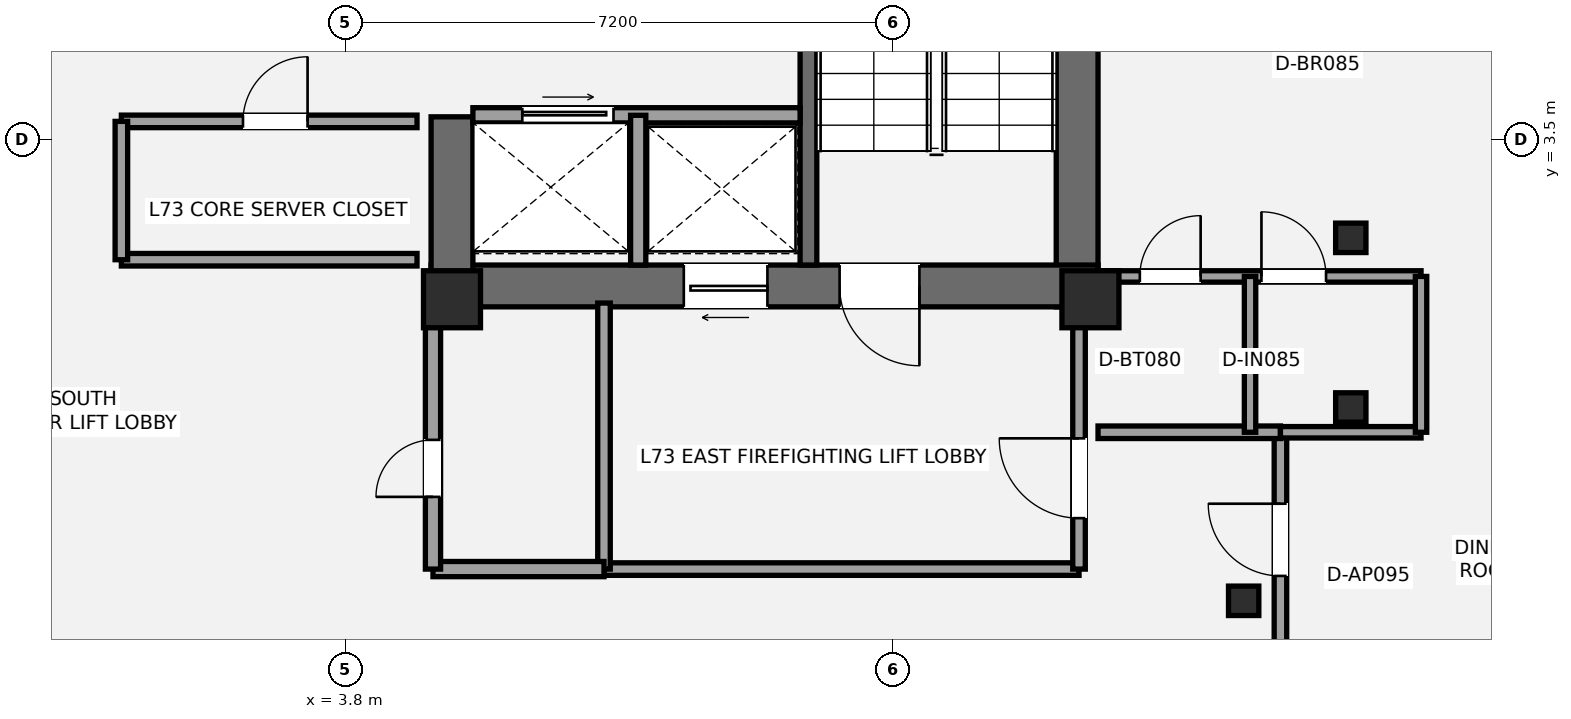
"""IFC4 building model, lengths in metres.
Left out: names, types, materials, properties, quantities, classifications, styles, units other than length and angle.
Written with IfcOpenShell. Run it as: python <this file> out.ifc"""

import sys

from ifc_helpers import new_model, si_unit, direction, frame, frame_2d, origin, origin_2d, place, context, subcontext, project, spatial, rectangle, i_section, extrude, element, fill, save


model = new_model("IFC4")
c1 = context("Model", 3, precision=1e-05, world=origin(), true_north=direction((0.0, 1.0)))
c2 = subcontext(c1, "Body", "Model", "MODEL_VIEW")
j1 = project(units=[si_unit("LENGTHUNIT", "METRE"), si_unit("PLANEANGLEUNIT", "RADIAN")], contexts=[c1])
p1 = place(None, origin())
s1 = spatial("IfcSite", under=j1, at=p1, CompositionType="ELEMENT")
p2 = place(p1, origin())
s2 = spatial("IfcBuilding", under=s1, at=p2, CompositionType="ELEMENT")
p3 = place(p2, frame((0.0, 0.0, 257.25)))
s3 = spatial("IfcBuildingStorey", under=s2, at=p3, CompositionType="ELEMENT", Elevation=257.25)
p4 = place(p3, frame((13.425, 1.3, 0.0), z_axis=(0.0, 0.0, 1.0), x_axis=(0.0, 1.0, 0.0)))
e1 = element("IfcWall", 1, at=p4, inside=s3, PredefinedType="SHEAR", context=c2, shape_type="SweptSolid", body=[
    extrude(rectangle(XDim=8.25, YDim=0.55, at=frame_2d((4.125, 0.0))), origin(), (0.0, 0.0, 1.0), 3.15),
])
p5 = place(p3, frame((13.7, 1.575, 0.0), z_axis=(0.0, 0.0, 1.0), x_axis=(-1.0, 0.0, 0.0)))
e2 = element("IfcWall", 2, at=p5, inside=s3, PredefinedType="SHEAR", context=c2, shape_type="SweptSolid", body=[
    extrude(rectangle(XDim=8.775, YDim=0.55, at=frame_2d((4.387, 0.0))), origin(), (0.0, 0.0, 1.0), 3.15),
])
p6 = place(p5, frame((2.35, 0.0, 0.0)))
e3 = element("IfcOpeningElement", 3, at=p6, cuts=e2, PredefinedType="OPENING", context=c2, shape_type="SweptSolid", body=[
    extrude(rectangle(XDim=1.05, YDim=2.15, at=frame_2d((0.525, 1.075))), frame((0.0, 0.285, 0.0), z_axis=(0.0, -1.0, 0.0), x_axis=(1.0, 0.0, 0.0)), (0.0, 0.0, 1.0), 0.57),
])
p7 = place(p5, frame((4.35, 0.0, 0.0)))
e4 = element("IfcOpeningElement", 4, at=p7, cuts=e2, PredefinedType="OPENING", context=c2, shape_type="SweptSolid", body=[
    extrude(rectangle(XDim=1.1, YDim=2.2, at=frame_2d((0.55, 1.1))), frame((0.0, 0.285, 0.0), z_axis=(0.0, -1.0, 0.0), x_axis=(1.0, 0.0, 0.0)), (0.0, 0.0, 1.0), 0.57),
])
p8 = place(p3, frame((5.2, 1.3, 0.0), z_axis=(0.0, 0.0, 1.0), x_axis=(0.0, 1.0, 0.0)))
e5 = element("IfcWall", 5, at=p8, inside=s3, PredefinedType="SHEAR", context=c2, shape_type="SweptSolid", body=[
    extrude(rectangle(XDim=2.5, YDim=0.55, at=frame_2d((1.25, 0.0))), origin(), (0.0, 0.0, 1.0), 3.15),
])
p9 = place(p3, frame((9.89, 1.85, 0.0), z_axis=(0.0, 0.0, 1.0), x_axis=(0.0, 1.0, 0.0)))
e6 = element("IfcWall", 6, at=p9, inside=s3, PredefinedType="SHEAR", context=c2, shape_type="SweptSolid", body=[
    extrude(rectangle(XDim=7.15, YDim=0.22, at=frame_2d((3.575, 0.0))), origin(), (0.0, 0.0, 1.0), 3.15),
])
for number, where, z_axis, x_axis in (
    (7, (5.2, 1.4, 0.0), (0.0, 0.0, 1.0), (1.0, 0.0, 0.0)),
    (8, (13.6, 1.4, 0.0), (0.0, 0.0, 1.0), (1.0, 0.0, 0.0)),
):
    element("IfcColumn", number, at=place(p3, frame(where, z_axis=z_axis, x_axis=x_axis)), inside=s3, PredefinedType="PILASTER", context=c2, shape_type="SweptSolid", body=[
        extrude(rectangle(XDim=0.75, YDim=0.75, at=origin_2d()), origin(), (0.0, 0.0, 1.0), 3.15),
    ])
for number, where, z_axis, x_axis in (
    (9, (17.026, 2.208, 0.0), (0.0, 0.0, 1.0), (1.0, 0.0, 0.0)),
    (10, (15.616, -2.567, 0.0), (0.0, 0.0, 1.0), (1.0, 0.0, 0.0)),
    (11, (17.026, -0.024, 0.0), (0.0, 0.0, 1.0), (1.0, 0.0, 0.0)),
):
    element("IfcColumn", number, at=place(p3, frame(where, z_axis=z_axis, x_axis=x_axis)), inside=s3, PredefinedType="COLUMN", context=c2, shape_type="SweptSolid", body=[
        extrude(i_section(OverallWidth=0.399, OverallDepth=0.387, WebThickness=0.021, FlangeThickness=0.033, at=origin_2d()), origin(), (0.0, 0.0, 1.0), 3.15),
    ])
p10 = place(p3, frame((7.2, -2.15, 0.0), z_axis=(0.0, 0.0, 1.0), x_axis=(1.0, 0.0, 0.0)))
e12 = element("IfcWall", 12, at=p10, inside=s3, PredefinedType="PARTITIONING", context=c2, shape_type="SweptSolid", body=[
    extrude(rectangle(XDim=6.25, YDim=0.165, at=frame_2d((3.125, 0.0))), origin(), (0.0, 0.0, 1.0), 2.93),
])
p11 = place(p3, frame((7.2, -2.15, 0.0), z_axis=(0.0, 0.0, 1.0), x_axis=(0.0, 1.0, 0.0)))
e13 = element("IfcWall", 13, at=p11, inside=s3, PredefinedType="PARTITIONING", context=c2, shape_type="SweptSolid", body=[
    extrude(rectangle(XDim=3.5, YDim=0.165, at=frame_2d((1.75, 0.0))), origin(), (0.0, 0.0, 1.0), 2.383),
])
p12 = place(p3, frame((13.45, -2.15, 0.0), z_axis=(0.0, 0.0, 1.0), x_axis=(0.0, 1.0, 0.0)))
e14 = element("IfcWall", 14, at=p12, inside=s3, PredefinedType="PARTITIONING", context=c2, shape_type="SweptSolid", body=[
    extrude(rectangle(XDim=3.5, YDim=0.165, at=frame_2d((1.75, 0.0))), origin(), (0.0, 0.0, 1.0), 2.383),
])
p13 = place(p12, frame((0.67, 0.0, 0.0)))
e15 = element("IfcOpeningElement", 15, at=p13, cuts=e14, PredefinedType="OPENING", context=c2, shape_type="SweptSolid", body=[
    extrude(rectangle(XDim=1.05, YDim=2.15, at=frame_2d((0.525, 1.075))), frame((0.0, 0.093, 0.0), z_axis=(0.0, -1.0, 0.0), x_axis=(1.0, 0.0, 0.0)), (0.0, 0.0, 1.0), 0.185),
])
p14 = place(p3, frame((4.95, -2.15, 0.0), z_axis=(0.0, 0.0, 1.0), x_axis=(1.0, 0.0, 0.0)))
e16 = element("IfcWall", 16, at=p14, inside=s3, PredefinedType="SOLIDWALL", context=c2, shape_type="SweptSolid", body=[
    extrude(rectangle(XDim=2.25, YDim=0.2, at=frame_2d((1.125, 0.0))), origin(), (0.0, 0.0, 1.0), 2.93),
])
p15 = place(p3, frame((4.95, -2.15, 0.0), z_axis=(0.0, 0.0, 1.0), x_axis=(0.0, 1.0, 0.0)))
e17 = element("IfcWall", 17, at=p15, inside=s3, PredefinedType="SOLIDWALL", context=c2, shape_type="SweptSolid", body=[
    extrude(rectangle(XDim=3.5, YDim=0.2, at=frame_2d((1.75, 0.0))), origin(), (0.0, 0.0, 1.0), 2.383),
])
p16 = place(p15, frame((0.95, 0.0, 0.0)))
e18 = element("IfcOpeningElement", 18, at=p16, cuts=e17, PredefinedType="OPENING", context=c2, shape_type="SweptSolid", body=[
    extrude(rectangle(XDim=0.75, YDim=2.1, at=frame_2d((0.375, 1.05))), frame((0.0, 0.11, 0.0), z_axis=(0.0, -1.0, 0.0), x_axis=(1.0, 0.0, 0.0)), (0.0, 0.0, 1.0), 0.22),
])
p17 = place(p3, frame((5.475, 3.82, 0.0), z_axis=(0.0, 0.0, 1.0), x_axis=(1.0, 0.0, 0.0)))
e19 = element("IfcWall", 19, at=p17, inside=s3, PredefinedType="SOLIDWALL", context=c2, shape_type="SweptSolid", body=[
    extrude(rectangle(XDim=4.305, YDim=0.2, at=frame_2d((2.152, 0.0))), origin(), (0.0, 0.0, 1.0), 2.93),
])
p18 = place(p17, frame((0.65, 0.0, 0.0)))
e20 = element("IfcOpeningElement", 20, at=p18, cuts=e19, PredefinedType="OPENING", context=c2, shape_type="SweptSolid", body=[
    extrude(rectangle(XDim=1.2, YDim=2.2, at=frame_2d((0.6, 1.1))), frame((0.0, 0.11, 0.0), z_axis=(0.0, -1.0, 0.0), x_axis=(1.0, 0.0, 0.0)), (0.0, 0.0, 1.0), 0.22),
])
p19 = place(p3, frame((7.65, 1.85, 0.0), z_axis=(0.0, 0.0, 1.0), x_axis=(0.0, 1.0, 0.0)))
e21 = element("IfcWall", 21, at=p19, inside=s3, PredefinedType="SOLIDWALL", context=c2, shape_type="SweptSolid", body=[
    extrude(rectangle(XDim=1.97, YDim=0.2, at=frame_2d((0.985, 0.0))), origin(), (0.0, 0.0, 1.0), 2.93),
])
p20 = place(p3, frame((0.85, 1.92, 0.0), z_axis=(0.0, 0.0, 1.0), x_axis=(1.0, 0.0, 0.0)))
e22 = element("IfcWall", 22, at=p20, inside=s3, PredefinedType="PARTITIONING", context=c2, shape_type="SweptSolid", body=[
    extrude(rectangle(XDim=3.89, YDim=0.165, at=frame_2d((1.945, 0.0))), origin(), (0.0, 0.0, 1.0), 2.07),
])
p21 = place(p3, frame((0.85, 3.74, 0.0), z_axis=(0.0, 0.0, 1.0), x_axis=(1.0, 0.0, 0.0)))
e23 = element("IfcWall", 23, at=p21, inside=s3, PredefinedType="PARTITIONING", context=c2, shape_type="SweptSolid", body=[
    extrude(rectangle(XDim=3.89, YDim=0.165, at=frame_2d((1.945, 0.0))), origin(), (0.0, 0.0, 1.0), 2.93),
])
p22 = place(p21, frame((1.6, 0.0, 0.0)))
e24 = element("IfcOpeningElement", 24, at=p22, cuts=e23, PredefinedType="OPENING", context=c2, shape_type="SweptSolid", body=[
    extrude(rectangle(XDim=0.85, YDim=2.1, at=frame_2d((0.425, 1.05))), frame((0.0, 0.093, 0.0), z_axis=(0.0, -1.0, 0.0), x_axis=(1.0, 0.0, 0.0)), (0.0, 0.0, 1.0), 0.185),
])
p23 = place(p3, frame((0.85, 1.92, 0.0), z_axis=(0.0, 0.0, 1.0), x_axis=(0.0, 1.0, 0.0)))
e25 = element("IfcWall", 25, at=p23, inside=s3, PredefinedType="PARTITIONING", context=c2, shape_type="SweptSolid", body=[
    extrude(rectangle(XDim=1.82, YDim=0.165, at=frame_2d((0.91, 0.0))), origin(), (0.0, 0.0, 1.0), 2.93),
])
p24 = place(p3, frame((16.1, -3.95, 0.0), z_axis=(0.0, 0.0, 1.0), x_axis=(0.0, 1.0, 0.0)))
e26 = element("IfcWall", 26, at=p24, inside=s3, PredefinedType="PARTITIONING", context=c2, shape_type="SweptSolid", body=[
    extrude(rectangle(XDim=3.6, YDim=0.165, at=frame_2d((1.8, 0.0))), origin(), (0.0, 0.0, 1.0), 2.317),
])
p25 = place(p24, frame((1.71, 0.0, 0.0)))
e27 = element("IfcOpeningElement", 27, at=p25, cuts=e26, PredefinedType="OPENING", context=c2, shape_type="SweptSolid", body=[
    extrude(rectangle(XDim=0.95, YDim=2.15, at=frame_2d((0.475, 1.075))), frame((0.0, 0.093, 0.0), z_axis=(0.0, -1.0, 0.0), x_axis=(1.0, 0.0, 0.0)), (0.0, 0.0, 1.0), 0.185),
])
p26 = place(p3, frame((13.7, -0.35, 0.0), z_axis=(0.0, 0.0, 1.0), x_axis=(1.0, 0.0, 0.0)))
e28 = element("IfcWall", 28, at=p26, inside=s3, PredefinedType="PARTITIONING", context=c2, shape_type="SweptSolid", body=[
    extrude(rectangle(XDim=2.4, YDim=0.165, at=frame_2d((1.2, 0.0))), origin(), (0.0, 0.0, 1.0), 2.383),
])
p27 = place(p3, frame((13.7, 1.7, 0.0), z_axis=(0.0, 0.0, 1.0), x_axis=(1.0, 0.0, 0.0)))
e29 = element("IfcWall", 29, at=p27, inside=s3, PredefinedType="PLUMBINGWALL", context=c2, shape_type="SweptSolid", body=[
    extrude(rectangle(XDim=4.25, YDim=0.15, at=frame_2d((2.125, 0.0))), origin(), (0.0, 0.0, 1.0), 2.383),
])
p28 = place(p27, frame((0.55, 0.0, 0.0)))
e30 = element("IfcOpeningElement", 30, at=p28, cuts=e29, PredefinedType="OPENING", context=c2, shape_type="SweptSolid", body=[
    extrude(rectangle(XDim=0.8, YDim=2.1, at=frame_2d((0.4, 1.05))), frame((0.0, 0.085, 0.0), z_axis=(0.0, -1.0, 0.0), x_axis=(1.0, 0.0, 0.0)), (0.0, 0.0, 1.0), 0.17),
])
p29 = place(p27, frame((2.15, 0.0, 0.0)))
e31 = element("IfcOpeningElement", 31, at=p29, cuts=e29, PredefinedType="OPENING", context=c2, shape_type="SweptSolid", body=[
    extrude(rectangle(XDim=0.85, YDim=2.1, at=frame_2d((0.425, 1.05))), frame((0.0, 0.085, 0.0), z_axis=(0.0, -1.0, 0.0), x_axis=(1.0, 0.0, 0.0)), (0.0, 0.0, 1.0), 0.17),
])
p30 = place(p3, frame((16.1, -0.35, 0.0), z_axis=(0.0, 0.0, 1.0), x_axis=(1.0, 0.0, 0.0)))
e32 = element("IfcWall", 32, at=p30, inside=s3, PredefinedType="PLUMBINGWALL", context=c2, shape_type="SweptSolid", body=[
    extrude(rectangle(XDim=1.85, YDim=0.15, at=frame_2d((0.925, 0.0))), origin(), (0.0, 0.0, 1.0), 2.383),
])
p31 = place(p3, frame((15.7, -0.35, 0.0), z_axis=(0.0, 0.0, 1.0), x_axis=(0.0, 1.0, 0.0)))
e33 = element("IfcWall", 33, at=p31, inside=s3, PredefinedType="PLUMBINGWALL", context=c2, shape_type="SweptSolid", body=[
    extrude(rectangle(XDim=2.05, YDim=0.15, at=frame_2d((1.025, 0.0))), origin(), (0.0, 0.0, 1.0), 2.93),
])
p32 = place(p3, frame((17.95, -0.35, 0.0), z_axis=(0.0, 0.0, 1.0), x_axis=(0.0, 1.0, 0.0)))
e34 = element("IfcWall", 34, at=p32, inside=s3, PredefinedType="PLUMBINGWALL", context=c2, shape_type="SweptSolid", body=[
    extrude(rectangle(XDim=2.05, YDim=0.15, at=frame_2d((1.025, 0.0))), origin(), (0.0, 0.0, 1.0), 2.383),
])
p33 = place(p6, origin())
e35 = element("IfcDoor", 35, at=p33, inside=s3, OperationType="SINGLE_SWING_LEFT", PredefinedType="DOOR", context=c2, shape_type="SweptSolid", body=[
    extrude(rectangle(XDim=1.05, YDim=2.15, at=frame_2d((0.525, 1.075))), frame((0.0, 0.025, 0.0), z_axis=(0.0, -1.0, 0.0), x_axis=(1.0, 0.0, 0.0)), (0.0, 0.0, 1.0), 0.05),
])
fill(e3, e35)
p34 = place(p13, origin())
e36 = element("IfcDoor", 36, at=p34, inside=s3, OperationType="SINGLE_SWING_RIGHT", PredefinedType="DOOR", context=c2, shape_type="SweptSolid", body=[
    extrude(rectangle(XDim=1.05, YDim=2.15, at=frame_2d((0.525, 1.075))), frame((0.0, 0.025, 0.0), z_axis=(0.0, -1.0, 0.0), x_axis=(1.0, 0.0, 0.0)), (0.0, 0.0, 1.0), 0.05),
])
fill(e15, e36)
p35 = place(p16, origin())
e37 = element("IfcDoor", 37, at=p35, inside=s3, OperationType="SINGLE_SWING_LEFT", PredefinedType="DOOR", context=c2, shape_type="SweptSolid", body=[
    extrude(rectangle(XDim=0.75, YDim=2.1, at=frame_2d((0.375, 1.05))), frame((0.0, 0.025, 0.0), z_axis=(0.0, -1.0, 0.0), x_axis=(1.0, 0.0, 0.0)), (0.0, 0.0, 1.0), 0.05),
])
fill(e18, e37)
p36 = place(p7, origin())
e38 = element("IfcDoor", 38, at=p36, inside=s3, OperationType="SLIDING_TO_LEFT", PredefinedType="DOOR", context=c2, shape_type="SweptSolid", body=[
    extrude(rectangle(XDim=1.1, YDim=2.2, at=frame_2d((0.55, 1.1))), frame((0.0, 0.025, 0.0), z_axis=(0.0, -1.0, 0.0), x_axis=(1.0, 0.0, 0.0)), (0.0, 0.0, 1.0), 0.05),
])
fill(e4, e38)
p37 = place(p18, origin())
e39 = element("IfcDoor", 39, at=p37, inside=s3, OperationType="SLIDING_TO_RIGHT", PredefinedType="DOOR", context=c2, shape_type="SweptSolid", body=[
    extrude(rectangle(XDim=1.2, YDim=2.2, at=frame_2d((0.6, 1.1))), frame((0.0, 0.025, 0.0), z_axis=(0.0, -1.0, 0.0), x_axis=(1.0, 0.0, 0.0)), (0.0, 0.0, 1.0), 0.05),
])
fill(e20, e39)
p38 = place(p22, origin())
e40 = element("IfcDoor", 40, at=p38, inside=s3, OperationType="SINGLE_SWING_RIGHT", PredefinedType="DOOR", context=c2, shape_type="SweptSolid", body=[
    extrude(rectangle(XDim=0.85, YDim=2.1, at=frame_2d((0.425, 1.05))), frame((0.0, 0.025, 0.0), z_axis=(0.0, -1.0, 0.0), x_axis=(1.0, 0.0, 0.0)), (0.0, 0.0, 1.0), 0.05),
])
fill(e24, e40)
p39 = place(p25, origin())
e41 = element("IfcDoor", 41, at=p39, inside=s3, OperationType="SINGLE_SWING_RIGHT", PredefinedType="DOOR", context=c2, shape_type="SweptSolid", body=[
    extrude(rectangle(XDim=0.95, YDim=2.15, at=frame_2d((0.475, 1.075))), frame((0.0, 0.025, 0.0), z_axis=(0.0, -1.0, 0.0), x_axis=(1.0, 0.0, 0.0)), (0.0, 0.0, 1.0), 0.05),
])
fill(e27, e41)
p40 = place(p28, origin())
e42 = element("IfcDoor", 42, at=p40, inside=s3, OperationType="SINGLE_SWING_RIGHT", PredefinedType="DOOR", context=c2, shape_type="SweptSolid", body=[
    extrude(rectangle(XDim=0.8, YDim=2.1, at=frame_2d((0.4, 1.05))), frame((0.0, 0.025, 0.0), z_axis=(0.0, -1.0, 0.0), x_axis=(1.0, 0.0, 0.0)), (0.0, 0.0, 1.0), 0.05),
])
fill(e30, e42)
p41 = place(p29, origin())
e43 = element("IfcDoor", 43, at=p41, inside=s3, OperationType="SINGLE_SWING_LEFT", PredefinedType="DOOR", context=c2, shape_type="SweptSolid", body=[
    extrude(rectangle(XDim=0.85, YDim=2.1, at=frame_2d((0.425, 1.05))), frame((0.0, 0.025, 0.0), z_axis=(0.0, -1.0, 0.0), x_axis=(1.0, 0.0, 0.0)), (0.0, 0.0, 1.0), 0.05),
])
fill(e31, e43)
save(model, sys.argv[1])
